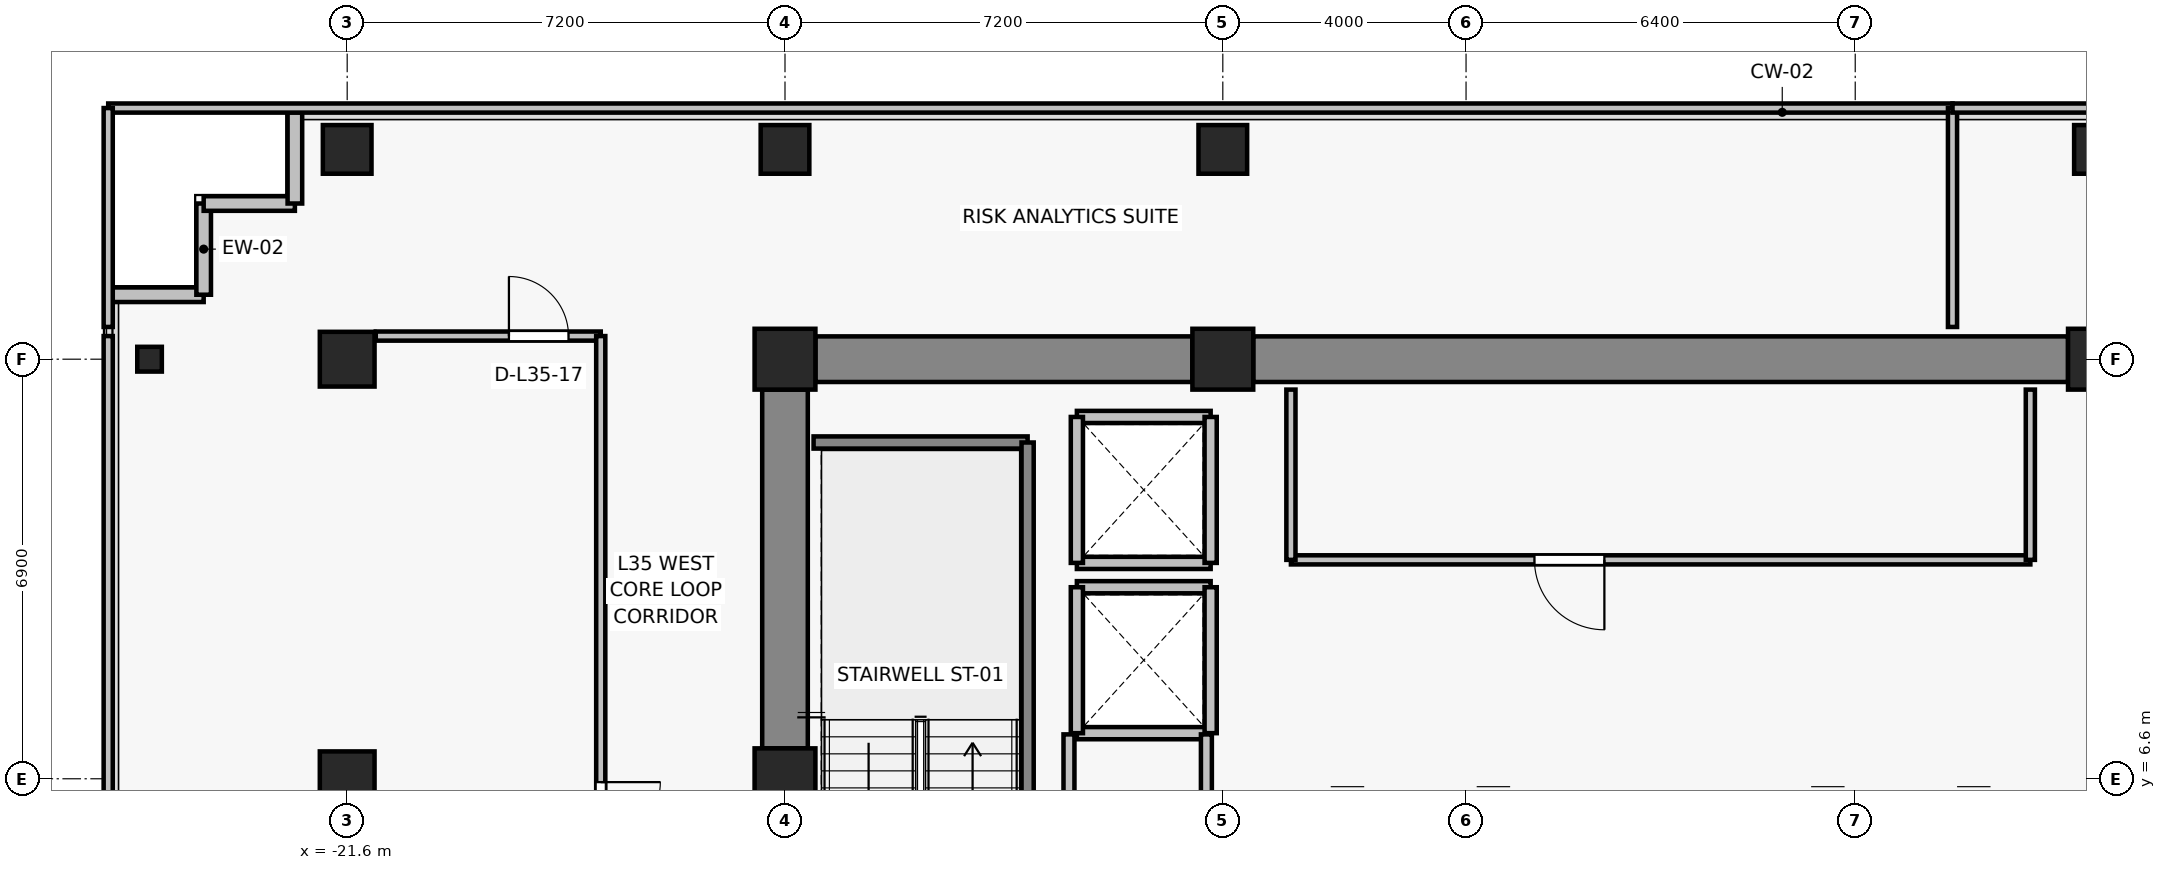
"""IFC4 building model, lengths in metres.
Left out: names, types, materials, properties, quantities, classifications, styles, units other than length and angle.
Written with IfcOpenShell. Run it as: python <this file> out.ifc"""

import sys

from ifc_helpers import new_model, si_unit, direction, frame, frame_2d, origin, origin_2d, place, context, subcontext, project, spatial, rectangle, i_section, extrude, source, transform, mapped, element, fill, save


model = new_model("IFC4")
c1 = context("Model", 3, precision=1e-05, world=origin(), true_north=direction((0.0, 1.0)))
c2 = subcontext(c1, "Body", "Model", "MODEL_VIEW")
j1 = project(units=[si_unit("LENGTHUNIT", "METRE"), si_unit("PLANEANGLEUNIT", "RADIAN")], contexts=[c1])
p1 = place(None, origin())
s1 = spatial("IfcSite", under=j1, at=p1, CompositionType="ELEMENT")
p2 = place(p1, origin())
s2 = spatial("IfcBuilding", under=s1, at=p2, CompositionType="ELEMENT")
p3 = place(p2, frame((0.0, 0.0, 126.4)))
s3 = spatial("IfcBuildingStorey", under=s2, at=p3, CompositionType="ELEMENT", Elevation=126.4)
for number, where, z_axis, x_axis in (
    (1, (-14.4, 6.6, 0.0), (0.0, 0.0, 1.0), (1.0, 0.0, 0.0)),
    (2, (-14.4, 13.5, 0.0), (0.0, 0.0, 1.0), (1.0, 0.0, 0.0)),
    (3, (-7.2, 13.5, 0.0), (0.0, 0.0, 1.0), (1.0, 0.0, 0.0)),
    (4, (7.2, 13.5, 0.0), (0.0, 0.0, 1.0), (1.0, 0.0, 0.0)),
):
    element("IfcColumn", number, at=place(p3, frame(where, z_axis=z_axis, x_axis=x_axis)), inside=s3, PredefinedType="COLUMN", context=c2, shape_type="SweptSolid", body=[
        extrude(rectangle(XDim=1.0, YDim=1.0, at=origin_2d()), origin(), (0.0, 0.0, 1.0), 3.3),
    ])
for number, where, z_axis, x_axis in (
    (5, (-21.6, 6.6, 0.0), (0.0, 0.0, 1.0), (1.0, 0.0, 0.0)),
    (6, (-21.6, 13.5, 0.0), (0.0, 0.0, 1.0), (1.0, 0.0, 0.0)),
):
    element("IfcColumn", number, at=place(p3, frame(where, z_axis=z_axis, x_axis=x_axis)), inside=s3, PredefinedType="COLUMN", context=c2, shape_type="SweptSolid", body=[
        extrude(rectangle(XDim=0.9, YDim=0.9, at=origin_2d()), origin(), (0.0, 0.0, 1.0), 3.3),
    ])
for number, where, z_axis, x_axis in (
    (7, (-14.4, 16.95, 0.0), (0.0, 0.0, 1.0), (1.0, 0.0, 0.0)),
    (8, (-7.2, 16.95, 0.0), (0.0, 0.0, 1.0), (1.0, 0.0, 0.0)),
    (9, (7.2, 16.95, 0.0), (0.0, 0.0, 1.0), (1.0, 0.0, 0.0)),
    (10, (-21.6, 16.95, 0.0), (0.0, 0.0, 1.0), (1.0, 0.0, 0.0)),
):
    element("IfcColumn", number, at=place(p3, frame(where, z_axis=z_axis, x_axis=x_axis)), inside=s3, PredefinedType="COLUMN", context=c2, shape_type="SweptSolid", body=[
        extrude(rectangle(XDim=0.8, YDim=0.8, at=origin_2d()), origin(), (0.0, 0.0, 1.0), 3.3),
    ])
p4 = place(p3, frame((-24.85, 13.5, 0.0), z_axis=(0.0, 0.0, 1.0), x_axis=(1.0, 0.0, 0.0)))
e11 = element("IfcColumn", 11, at=p4, inside=s3, PredefinedType="COLUMN", context=c2, shape_type="SweptSolid", body=[
    extrude(i_section(OverallWidth=0.404, OverallDepth=0.407, WebThickness=0.022, FlangeThickness=0.032, FilletRadius=0.015, at=origin_2d()), origin(), (0.0, 0.0, 1.0), 3.3),
])
p5 = place(p3, frame((-13.9, 13.5, 0.0), z_axis=(0.0, 0.0, 1.0), x_axis=(1.0, 0.0, 0.0)))
e12 = element("IfcWall", 12, at=p5, inside=s3, PredefinedType="SHEAR", context=c2, shape_type="SweptSolid", body=[
    extrude(rectangle(XDim=6.2, YDim=0.75, at=frame_2d((3.1, 0.0))), origin(), (0.0, 0.0, 1.0), 3.075),
])
p6 = place(p3, frame((-6.7, 13.5, 0.0), z_axis=(0.0, 0.0, 1.0), x_axis=(1.0, 0.0, 0.0)))
e13 = element("IfcWall", 13, at=p6, inside=s3, PredefinedType="SHEAR", context=c2, shape_type="SweptSolid", body=[
    extrude(rectangle(XDim=13.4, YDim=0.75, at=frame_2d((6.7, 0.0))), origin(), (0.0, 0.0, 1.0), 3.075),
])
p7 = place(p3, frame((-14.4, 7.1, 0.0), z_axis=(0.0, 0.0, 1.0), x_axis=(0.0, 1.0, 0.0)))
e14 = element("IfcWall", 14, at=p7, inside=s3, PredefinedType="SHEAR", context=c2, shape_type="SweptSolid", body=[
    extrude(rectangle(XDim=5.9, YDim=0.75, at=frame_2d((2.95, 0.0))), origin(), (0.0, 0.0, 1.0), 3.075),
])
for number, where, z_axis, x_axis in (
    (15, (-23.96, 14.56, 0.0), (0.0, 0.0, 1.0), (-1.0, 0.0, 0.0)),
    (16, (-23.96, 16.06, 0.0), (0.0, 0.0, 1.0), (0.0, -1.0, 0.0)),
    (17, (-22.46, 16.06, 0.0), (0.0, 0.0, 1.0), (-1.0, 0.0, 0.0)),
):
    element("IfcWall", number, at=place(p3, frame(where, z_axis=z_axis, x_axis=x_axis)), inside=s3, PredefinedType="SOLIDWALL", context=c2, shape_type="SweptSolid", body=[
        extrude(rectangle(XDim=1.5, YDim=0.24, at=frame_2d((0.75, 0.0))), origin(), (0.0, 0.0, 1.0), 3.075),
    ])
p8 = place(p3, frame((-22.46, 17.56, 0.0), z_axis=(0.0, 0.0, 1.0), x_axis=(0.0, -1.0, 0.0)))
e18 = element("IfcWall", 18, at=p8, inside=s3, PredefinedType="SOLIDWALL", context=c2, shape_type="SweptSolid", body=[
    extrude(rectangle(XDim=1.5, YDim=0.24, at=frame_2d((0.75, 0.0))), origin(), (0.0, 0.0, 1.0), 2.565),
])
for number, where, z_axis, x_axis in (
    (19, (-7.4, 7.35, 0.0), (0.0, 0.0, 1.0), (-1.0, 0.0, 0.0)),
    (20, (-9.6, 9.75, 0.0), (0.0, 0.0, 1.0), (1.0, 0.0, 0.0)),
):
    element("IfcWall", number, at=place(p3, frame(where, z_axis=z_axis, x_axis=x_axis)), inside=s3, PredefinedType="SOLIDWALL", context=c2, shape_type="SweptSolid", body=[
        extrude(rectangle(XDim=2.2, YDim=0.2, at=frame_2d((1.1, 0.0))), origin(), (0.0, 0.0, 1.0), 2.515),
    ])
p9 = place(p3, frame((-9.6, 7.35, 0.0), z_axis=(0.0, 0.0, 1.0), x_axis=(0.0, 1.0, 0.0)))
e21 = element("IfcWall", 21, at=p9, inside=s3, PredefinedType="SOLIDWALL", context=c2, shape_type="SweptSolid", body=[
    extrude(rectangle(XDim=2.4, YDim=0.2, at=frame_2d((1.2, 0.0))), origin(), (0.0, 0.0, 1.0), 3.075),
])
p10 = place(p3, frame((-7.4, 9.75, 0.0), z_axis=(0.0, 0.0, 1.0), x_axis=(0.0, -1.0, 0.0)))
e22 = element("IfcWall", 22, at=p10, inside=s3, PredefinedType="SOLIDWALL", context=c2, shape_type="SweptSolid", body=[
    extrude(rectangle(XDim=2.4, YDim=0.2, at=frame_2d((1.2, 0.0))), origin(), (0.0, 0.0, 1.0), 2.515),
])
for number, where, z_axis, x_axis in (
    (23, (-7.4, 10.15, 0.0), (0.0, 0.0, 1.0), (-1.0, 0.0, 0.0)),
    (24, (-9.6, 12.55, 0.0), (0.0, 0.0, 1.0), (1.0, 0.0, 0.0)),
):
    element("IfcWall", number, at=place(p3, frame(where, z_axis=z_axis, x_axis=x_axis)), inside=s3, PredefinedType="SOLIDWALL", context=c2, shape_type="SweptSolid", body=[
        extrude(rectangle(XDim=2.2, YDim=0.2, at=frame_2d((1.1, 0.0))), origin(), (0.0, 0.0, 1.0), 2.515),
    ])
p11 = place(p3, frame((-9.6, 10.15, 0.0), z_axis=(0.0, 0.0, 1.0), x_axis=(0.0, 1.0, 0.0)))
e25 = element("IfcWall", 25, at=p11, inside=s3, PredefinedType="SOLIDWALL", context=c2, shape_type="SweptSolid", body=[
    extrude(rectangle(XDim=2.4, YDim=0.2, at=frame_2d((1.2, 0.0))), origin(), (0.0, 0.0, 1.0), 3.075),
])
p12 = place(p3, frame((-7.4, 12.55, 0.0), z_axis=(0.0, 0.0, 1.0), x_axis=(0.0, -1.0, 0.0)))
e26 = element("IfcWall", 26, at=p12, inside=s3, PredefinedType="SOLIDWALL", context=c2, shape_type="SweptSolid", body=[
    extrude(rectangle(XDim=2.4, YDim=0.2, at=frame_2d((1.2, 0.0))), origin(), (0.0, 0.0, 1.0), 2.515),
])
p13 = place(p3, frame((-13.93, 12.13, 0.0), z_axis=(0.0, 0.0, 1.0), x_axis=(1.0, 0.0, 0.0)))
e27 = element("IfcWall", 27, at=p13, inside=s3, PredefinedType="SOLIDWALL", context=c2, shape_type="SweptSolid", body=[
    extrude(rectangle(XDim=3.52, YDim=0.2, at=frame_2d((1.76, 0.0))), origin(), (0.0, 0.0, 1.0), 3.075),
])
p14 = place(p3, frame((-10.41, 12.13, 0.0), z_axis=(0.0, 0.0, 1.0), x_axis=(0.0, -1.0, 0.0)))
e28 = element("IfcWall", 28, at=p14, inside=s3, PredefinedType="SOLIDWALL", context=c2, shape_type="SweptSolid", body=[
    extrude(rectangle(XDim=8.84, YDim=0.2, at=frame_2d((4.42, 0.0))), origin(), (0.0, 0.0, 1.0), 3.075),
])
p15 = place(p3, frame((-9.73, 6.24, 0.0), z_axis=(0.0, 0.0, 1.0), x_axis=(0.0, 1.0, 0.0)))
e29 = element("IfcWall", 29, at=p15, inside=s3, PredefinedType="PARTITIONING", context=c2, shape_type="SweptSolid", body=[
    extrude(rectangle(XDim=1.09, YDim=0.18, at=frame_2d((0.545, 0.0))), origin(), (0.0, 0.0, 1.0), 3.075),
])
p16 = place(p3, frame((-7.47, 7.33, 0.0), z_axis=(0.0, 0.0, 1.0), x_axis=(0.0, -1.0, 0.0)))
e30 = element("IfcWall", 30, at=p16, inside=s3, PredefinedType="PARTITIONING", context=c2, shape_type="SweptSolid", body=[
    extrude(rectangle(XDim=1.09, YDim=0.18, at=frame_2d((0.545, 0.0))), origin(), (0.0, 0.0, 1.0), 2.515),
])
p17 = place(p3, frame((6.08, 10.2, 0.0), z_axis=(0.0, 0.0, 1.0), x_axis=(-1.0, 0.0, 0.0)))
e31 = element("IfcWall", 31, at=p17, inside=s3, PredefinedType="PARTITIONING", context=c2, shape_type="SweptSolid", body=[
    extrude(rectangle(XDim=12.16, YDim=0.15, at=frame_2d((6.08, 0.0))), origin(), (0.0, 0.0, 1.0), 3.075),
])
p18 = place(p17, frame((7.005, 0.0, 0.0)))
e32 = element("IfcOpeningElement", 32, at=p18, cuts=e31, PredefinedType="OPENING", context=c2, shape_type="SweptSolid", body=[
    extrude(rectangle(XDim=1.15, YDim=2.15, at=frame_2d((0.575, 1.075))), frame((0.0, 0.085, 0.0), z_axis=(0.0, -1.0, 0.0), x_axis=(1.0, 0.0, 0.0)), (0.0, 0.0, 1.0), 0.17),
])
for number, where, z_axis, x_axis in (
    (33, (-6.08, 10.2, 0.0), (0.0, 0.0, 1.0), (0.0, 1.0, 0.0)),
    (34, (6.08, 13.0, 0.0), (0.0, 0.0, 1.0), (0.0, -1.0, 0.0)),
):
    element("IfcWall", number, at=place(p3, frame(where, z_axis=z_axis, x_axis=x_axis)), inside=s3, PredefinedType="PARTITIONING", context=c2, shape_type="SweptSolid", body=[
        extrude(rectangle(XDim=2.8, YDim=0.15, at=frame_2d((1.4, 0.0))), origin(), (0.0, 0.0, 1.0), 3.075),
    ])
p19 = place(p3, frame((-21.13, 13.88, 0.0), z_axis=(0.0, 0.0, 1.0), x_axis=(1.0, 0.0, 0.0)))
e35 = element("IfcWall", 35, at=p19, inside=s3, PredefinedType="PARTITIONING", context=c2, shape_type="SweptSolid", body=[
    extrude(rectangle(XDim=3.7, YDim=0.15, at=frame_2d((1.85, 0.0))), origin(), (0.0, 0.0, 1.0), 3.075),
])
p20 = place(p19, frame((2.19, 0.0, 0.0)))
e36 = element("IfcOpeningElement", 36, at=p20, cuts=e35, PredefinedType="OPENING", context=c2, shape_type="SweptSolid", body=[
    extrude(rectangle(XDim=0.98, YDim=2.15, at=frame_2d((0.49, 1.075))), frame((0.0, 0.085, 0.0), z_axis=(0.0, -1.0, 0.0), x_axis=(1.0, 0.0, 0.0)), (0.0, 0.0, 1.0), 0.17),
])
p21 = place(p3, frame((-25.53, -1.77, 0.0), z_axis=(0.0, 0.0, 1.0), x_axis=(0.0, 1.0, 0.0)))
e37 = element("IfcWall", 37, at=p21, inside=s3, PredefinedType="PARTITIONING", context=c2, shape_type="SweptSolid", body=[
    extrude(rectangle(XDim=15.65, YDim=0.15, at=frame_2d((7.825, 0.0))), origin(), (0.0, 0.0, 1.0), 3.075),
])
p22 = place(p3, frame((-17.43, 13.88, 0.0), z_axis=(0.0, 0.0, 1.0), x_axis=(0.0, -1.0, 0.0)))
e38 = element("IfcWall", 38, at=p22, inside=s3, PredefinedType="PARTITIONING", context=c2, shape_type="SweptSolid", body=[
    extrude(rectangle(XDim=15.65, YDim=0.15, at=frame_2d((7.825, 0.0))), origin(), (0.0, 0.0, 1.0), 2.515),
])
p23 = place(p22, frame((7.335, 0.0, 0.0)))
e39 = element("IfcOpeningElement", 39, at=p23, cuts=e38, PredefinedType="OPENING", context=c2, shape_type="SweptSolid", body=[
    extrude(rectangle(XDim=0.98, YDim=2.15, at=frame_2d((0.49, 1.075))), frame((0.0, 0.085, 0.0), z_axis=(0.0, -1.0, 0.0), x_axis=(1.0, 0.0, 0.0)), (0.0, 0.0, 1.0), 0.17),
])
p24 = place(p3, frame((-25.53, 17.63, 0.0), z_axis=(0.0, 0.0, 1.0), x_axis=(1.0, 0.0, 0.0)))
e40 = element("IfcWall", 40, at=p24, inside=s3, PredefinedType="PARTITIONING", context=c2, shape_type="SweptSolid", body=[
    extrude(rectangle(XDim=30.33, YDim=0.15, at=frame_2d((15.165, 0.0))), origin(), (0.0, 0.0, 1.0), 3.075),
])
p25 = place(p3, frame((-25.53, 14.03, 0.0), z_axis=(0.0, 0.0, 1.0), x_axis=(0.0, 1.0, 0.0)))
e41 = element("IfcWall", 41, at=p25, inside=s3, PredefinedType="PARTITIONING", context=c2, shape_type="SweptSolid", body=[
    extrude(rectangle(XDim=3.6, YDim=0.15, at=frame_2d((1.8, 0.0))), origin(), (0.0, 0.0, 1.0), 3.075),
])
p26 = place(p3, frame((4.8, 17.63, 0.0), z_axis=(0.0, 0.0, 1.0), x_axis=(0.0, -1.0, 0.0)))
e42 = element("IfcWall", 42, at=p26, inside=s3, PredefinedType="PARTITIONING", context=c2, shape_type="SweptSolid", body=[
    extrude(rectangle(XDim=3.6, YDim=0.15, at=frame_2d((1.8, 0.0))), origin(), (0.0, 0.0, 1.0), 2.565),
])
p27 = place(p3, frame((4.8, 17.63, 0.0), z_axis=(0.0, 0.0, 1.0), x_axis=(1.0, 0.0, 0.0)))
e43 = element("IfcWall", 43, at=p27, inside=s3, PredefinedType="PARTITIONING", context=c2, shape_type="SweptSolid", body=[
    extrude(rectangle(XDim=24.73, YDim=0.15, at=frame_2d((12.365, 0.0))), origin(), (0.0, 0.0, 1.0), 3.075),
])
m1 = source(origin(), c2, "Body", "SweptSolid", [
    extrude(rectangle(XDim=1.15, YDim=2.15, at=frame_2d((0.575, 1.075))), frame((0.0, 0.025, 0.0), z_axis=(0.0, -1.0, 0.0), x_axis=(1.0, 0.0, 0.0)), (0.0, 0.0, 1.0), 0.05),
])
p28 = place(p18, origin())
e44 = element("IfcDoor", 44, at=p28, inside=s3, OperationType="SINGLE_SWING_LEFT", PredefinedType="DOOR", context=c2, shape_type="MappedRepresentation", body=[
    mapped(m1, transform((0.0, 0.0, 0.0), x_axis=(1.0, 0.0, 0.0), y_axis=(0.0, 1.0, 0.0), z_axis=(0.0, 0.0, 1.0), scale=1.0)),
])
fill(e32, e44)
m2 = source(origin(), c2, "Body", "SweptSolid", [
    extrude(rectangle(XDim=0.98, YDim=2.15, at=frame_2d((0.49, 1.075))), frame((0.0, 0.025, 0.0), z_axis=(0.0, -1.0, 0.0), x_axis=(1.0, 0.0, 0.0)), (0.0, 0.0, 1.0), 0.05),
])
p29 = place(p23, origin())
e45 = element("IfcDoor", 45, at=p29, inside=s3, OperationType="SINGLE_SWING_LEFT", PredefinedType="DOOR", context=c2, shape_type="MappedRepresentation", body=[
    mapped(m2, transform((0.0, 0.0, 0.0), x_axis=(1.0, 0.0, 0.0), y_axis=(0.0, 1.0, 0.0), z_axis=(0.0, 0.0, 1.0), scale=1.0)),
])
fill(e39, e45)
p30 = place(p20, origin())
e46 = element("IfcDoor", 46, at=p30, inside=s3, OperationType="SINGLE_SWING_LEFT", PredefinedType="DOOR", context=c2, shape_type="MappedRepresentation", body=[
    mapped(m2, transform((0.0, 0.0, 0.0), x_axis=(1.0, 0.0, 0.0), y_axis=(0.0, 1.0, 0.0), z_axis=(0.0, 0.0, 1.0), scale=1.0)),
])
fill(e36, e46)
save(model, sys.argv[1])
